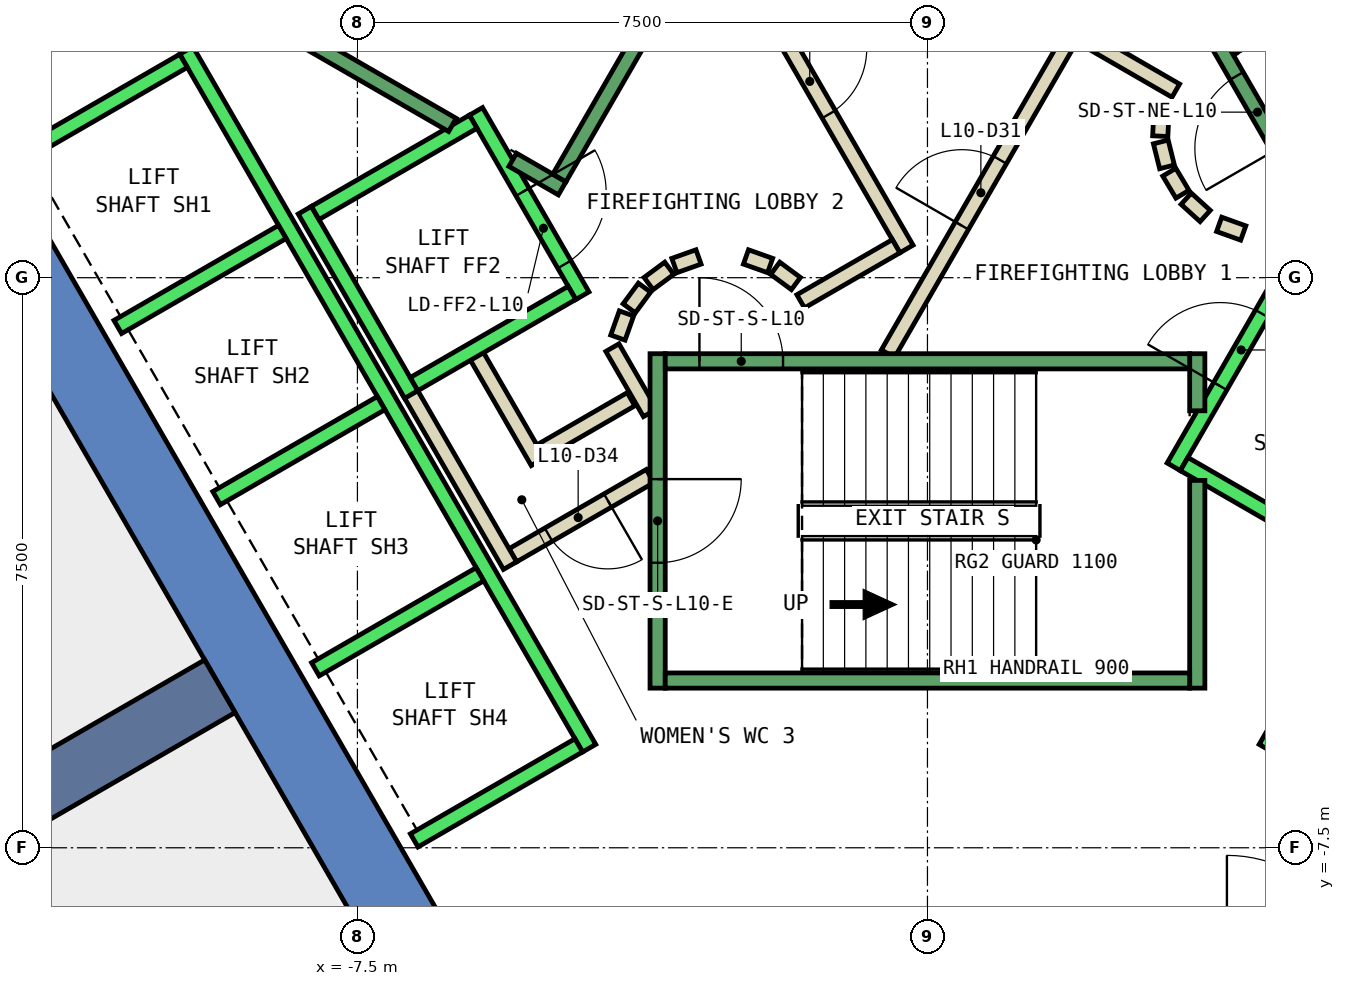
"""IFC4 building model, lengths in metres.
Left out: names, types, materials, properties, quantities, classifications, styles, units other than length and angle.
Written with IfcOpenShell. Run it as: python <this file> out.ifc"""

import sys

from ifc_helpers import new_model, si_unit, direction, frame, frame_2d, origin, place, context, subcontext, project, spatial, polyline, rectangle, outline, extrude, element, fill, save


model = new_model("IFC4")
c1 = context("Model", 3, precision=1e-05, world=origin(), true_north=direction((0.0, 1.0)))
c2 = subcontext(c1, "Body", "Model", "MODEL_VIEW")
j1 = project(units=[si_unit("LENGTHUNIT", "METRE"), si_unit("PLANEANGLEUNIT", "RADIAN")], contexts=[c1])
p1 = place(None, origin())
s1 = spatial("IfcSite", under=j1, at=p1, CompositionType="ELEMENT")
p2 = place(p1, origin())
s2 = spatial("IfcBuilding", under=s1, at=p2, CompositionType="ELEMENT")
p3 = place(p2, frame((0.0, 0.0, 51.8)))
s3 = spatial("IfcBuildingStorey", under=s2, at=p3, CompositionType="ELEMENT", Elevation=51.8)
p4 = place(p3, frame((0.0, 0.0, -0.4)))
e1 = element("IfcWall", 1, at=p4, inside=s3, PredefinedType="SHEAR", context=c2, shape_type="SweptSolid", body=[
    extrude(outline(polyline([(-13.856, 2.5), (-6.928, -9.5), (-6.351, -8.5), (-12.702, 2.5), (-13.856, 2.5)])), origin(), (0.0, 0.0, 1.0), 4.2),
])
p5 = place(p3, frame((-9.31, -5.375, -0.4), z_axis=(0.0, 0.0, 1.0), x_axis=(-0.866017533419, -0.500013631625, 0.0)))
e2 = element("IfcWall", 2, at=p5, inside=s3, PredefinedType="SHEAR", context=c2, shape_type="SweptSolid", body=[
    extrude(rectangle(XDim=9.0, YDim=0.8, at=frame_2d((4.5, 0.0))), origin(), (0.0, 0.0, 1.0), 4.2),
])
p6 = place(p3, frame((-3.9, -1.599, 0.0), z_axis=(0.0, 0.0, 1.0), x_axis=(-0.865969445389, -0.500096910261, 0.0)))
e3 = element("IfcWall", 3, at=p6, inside=s3, PredefinedType="PARTITIONING", context=c2, shape_type="SweptSolid", body=[
    extrude(rectangle(XDim=1.373, YDim=0.2, at=frame_2d((0.687, 0.0))), origin(), (0.0, 0.0, 1.0), 3.8),
])
p7 = place(p3, frame((-5.126, -2.422, 0.0), z_axis=(0.0, 0.0, 1.0), x_axis=(-0.500062241894, 0.865989465428, 0.0)))
e4 = element("IfcWall", 4, at=p7, inside=s3, PredefinedType="PARTITIONING", context=c2, shape_type="SweptSolid", body=[
    extrude(rectangle(XDim=1.7, YDim=0.2, at=frame_2d((0.85, 0.0))), origin(), (0.0, 0.0, 1.0), 3.8),
])
p8 = place(p3, frame((-3.65, -2.61, 0.0), z_axis=(0.0, 0.0, 1.0), x_axis=(-0.866072462134, -0.499918483688, 0.0)))
e5 = element("IfcWall", 5, at=p8, inside=s3, PredefinedType="PARTITIONING", context=c2, shape_type="SweptSolid", body=[
    extrude(rectangle(XDim=2.084, YDim=0.2, at=frame_2d((1.042, 0.0))), origin(), (0.0, 0.0, 1.0), 3.8),
])
p9 = place(p8, frame((0.642, 0.0, 0.0)))
e6 = element("IfcOpeningElement", 6, at=p9, cuts=e5, PredefinedType="OPENING", context=c2, shape_type="SweptSolid", body=[
    extrude(rectangle(XDim=0.9, YDim=2.1, at=frame_2d((0.45, 1.05))), frame((0.0, 0.11, 0.0), z_axis=(0.0, -1.0, 0.0), x_axis=(1.0, 0.0, 0.0)), (0.0, 0.0, 1.0), 0.22),
])
p10 = place(p3, frame((-5.492, -3.788, 0.0), z_axis=(0.0, 0.0, 1.0), x_axis=(-0.500008949224, 0.866020236886, 0.0)))
e7 = element("IfcWall", 7, at=p10, inside=s3, PredefinedType="PARTITIONING", context=c2, shape_type="SweptSolid", body=[
    extrude(rectangle(XDim=2.68, YDim=0.2, at=frame_2d((1.34, 0.0))), origin(), (0.0, 0.0, 1.0), 3.8),
])
p11 = place(p3, frame((-4.145, -0.92, 0.0), z_axis=(0.0, 0.0, 1.0), x_axis=(0.499743786207, -0.866173278362, 0.0)))
e8 = element("IfcWall", 8, at=p11, inside=s3, PredefinedType="PARTITIONING", context=c2, shape_type="SweptSolid", body=[
    extrude(rectangle(XDim=0.991, YDim=0.2, at=frame_2d((0.495, 0.0))), origin(), (0.0, 0.0, 1.0), 3.8),
])
p12 = place(p3, frame((-0.52, -1.0, 0.0), z_axis=(0.0, 0.0, 1.0), x_axis=(0.50011622646, 0.865958290007, 0.0)))
e9 = element("IfcWall", 9, at=p12, inside=s3, PredefinedType="PARTITIONING", context=c2, shape_type="SweptSolid", body=[
    extrude(rectangle(XDim=4.991, YDim=0.2, at=frame_2d((2.496, 0.0))), origin(), (0.0, 0.0, 1.0), 3.8),
])
p13 = place(p12, frame((1.945, 0.0, 0.0)))
e10 = element("IfcOpeningElement", 10, at=p13, cuts=e9, PredefinedType="OPENING", context=c2, shape_type="SweptSolid", body=[
    extrude(rectangle(XDim=1.0, YDim=2.1, at=frame_2d((0.5, 1.05))), frame((0.0, 0.11, 0.0), z_axis=(0.0, -1.0, 0.0), x_axis=(1.0, 0.0, 0.0)), (0.0, 0.0, 1.0), 0.22),
])
p14 = place(p3, frame((2.012, 3.186, 0.0), z_axis=(0.0, 0.0, 1.0), x_axis=(0.865891012941, -0.500232699559, 0.0)))
e11 = element("IfcWall", 11, at=p14, inside=s3, PredefinedType="PARTITIONING", context=c2, shape_type="SweptSolid", body=[
    extrude(rectangle(XDim=1.449, YDim=0.2, at=frame_2d((0.725, 0.0))), origin(), (0.0, 0.0, 1.0), 3.8),
])
p15 = place(p3, frame((3.079, 2.199, 0.0), z_axis=(0.0, 0.0, 1.0), x_axis=(-0.047771483479, -0.998858290933, 0.0)))
e12 = element("IfcWall", 12, at=p15, inside=s3, PredefinedType="PARTITIONING", context=c2, shape_type="SweptSolid", body=[
    extrude(rectangle(XDim=0.337, YDim=0.2, at=frame_2d((0.169, 0.0))), origin(), (0.0, 0.0, 1.0), 3.8),
])
p16 = place(p3, frame((3.07, 1.786, 0.0), z_axis=(0.0, 0.0, 1.0), x_axis=(0.242705583207, -0.970099994784, 0.0)))
e13 = element("IfcWall", 13, at=p16, inside=s3, PredefinedType="PARTITIONING", context=c2, shape_type="SweptSolid", body=[
    extrude(rectangle(XDim=0.338, YDim=0.2, at=frame_2d((0.169, 0.0))), origin(), (0.0, 0.0, 1.0), 3.8),
])
for number, where, z_axis, x_axis in (
    (14, (3.182, 1.388, 0.0), (0.0, 0.0, 1.0), (0.512, -0.859, 0.0)),
    (15, (3.404, 1.039, 0.0), (0.0, 0.0, 1.0), (0.74, -0.672, 0.0)),
):
    element("IfcWall", number, at=place(p3, frame(where, z_axis=z_axis, x_axis=x_axis)), inside=s3, PredefinedType="PARTITIONING", context=c2, shape_type="SweptSolid", body=[
        extrude(rectangle(XDim=0.338, YDim=0.2, at=frame_2d((0.169, 0.0))), origin(), (0.0, 0.0, 1.0), 3.8),
    ])
p17 = place(p3, frame((3.838, 0.702, 0.0), z_axis=(0.0, 0.0, 1.0), x_axis=(0.941035081519, -0.338308993895, 0.0)))
e16 = element("IfcWall", 16, at=p17, inside=s3, PredefinedType="PARTITIONING", context=c2, shape_type="SweptSolid", body=[
    extrude(rectangle(XDim=0.337, YDim=0.2, at=frame_2d((0.168, 0.0))), origin(), (0.0, 0.0, 1.0), 3.8),
])
p18 = place(p3, frame((-2.771, 4.7, 0.0), z_axis=(0.0, 0.0, 1.0), x_axis=(0.499969479948, -0.866043023828, 0.0)))
e17 = element("IfcWall", 17, at=p18, inside=s3, PredefinedType="PARTITIONING", context=c2, shape_type="SweptSolid", body=[
    extrude(rectangle(XDim=4.99, YDim=0.2, at=frame_2d((2.495, 0.0))), origin(), (0.0, 0.0, 1.0), 3.8),
])
p19 = place(p18, frame((1.945, 0.0, 0.0)))
e18 = element("IfcOpeningElement", 18, at=p19, cuts=e17, PredefinedType="OPENING", context=c2, shape_type="SweptSolid", body=[
    extrude(rectangle(XDim=1.0, YDim=2.1, at=frame_2d((0.5, 1.05))), frame((0.0, 0.11, 0.0), z_axis=(0.0, -1.0, 0.0), x_axis=(1.0, 0.0, 0.0)), (0.0, 0.0, 1.0), 0.22),
])
p20 = place(p3, frame((-0.412, 0.414, 0.0), z_axis=(0.0, 0.0, 1.0), x_axis=(-0.866017369001, -0.500013916395, 0.0)))
e19 = element("IfcWall", 19, at=p20, inside=s3, PredefinedType="PARTITIONING", context=c2, shape_type="SweptSolid", body=[
    extrude(rectangle(XDim=1.45, YDim=0.2, at=frame_2d((0.725, 0.0))), origin(), (0.0, 0.0, 1.0), 3.8),
])
p21 = place(p3, frame((-1.731, -0.077, 0.0), z_axis=(0.0, 0.0, 1.0), x_axis=(-0.804311165252, 0.594208338422, 0.0)))
e20 = element("IfcWall", 20, at=p21, inside=s3, PredefinedType="PARTITIONING", context=c2, shape_type="SweptSolid", body=[
    extrude(rectangle(XDim=0.338, YDim=0.2, at=frame_2d((0.169, 0.0))), origin(), (0.0, 0.0, 1.0), 3.8),
])
p22 = place(p3, frame((-2.07, 0.16, 0.0), z_axis=(0.0, 0.0, 1.0), x_axis=(-0.942199461132, 0.335052496547, 0.0)))
e21 = element("IfcWall", 21, at=p22, inside=s3, PredefinedType="PARTITIONING", context=c2, shape_type="SweptSolid", body=[
    extrude(rectangle(XDim=0.337, YDim=0.2, at=frame_2d((0.169, 0.0))), origin(), (0.0, 0.0, 1.0), 3.8),
])
p23 = place(p3, frame((-3.012, 0.273, 0.0), z_axis=(0.0, 0.0, 1.0), x_axis=(-0.942280615813, -0.334824194261, 0.0)))
e22 = element("IfcWall", 22, at=p23, inside=s3, PredefinedType="PARTITIONING", context=c2, shape_type="SweptSolid", body=[
    extrude(rectangle(XDim=0.338, YDim=0.2, at=frame_2d((0.169, 0.0))), origin(), (0.0, 0.0, 1.0), 3.8),
])
p24 = place(p3, frame((-3.397, 0.124, 0.0), z_axis=(0.0, 0.0, 1.0), x_axis=(-0.804311165252, -0.594208338422, 0.0)))
e23 = element("IfcWall", 23, at=p24, inside=s3, PredefinedType="PARTITIONING", context=c2, shape_type="SweptSolid", body=[
    extrude(rectangle(XDim=0.338, YDim=0.2, at=frame_2d((0.169, 0.0))), origin(), (0.0, 0.0, 1.0), 3.8),
])
p25 = place(p3, frame((-3.723, -0.131, 0.0), z_axis=(0.0, 0.0, 1.0), x_axis=(-0.594675113454, -0.803966112121, 0.0)))
e24 = element("IfcWall", 24, at=p25, inside=s3, PredefinedType="PARTITIONING", context=c2, shape_type="SweptSolid", body=[
    extrude(rectangle(XDim=0.338, YDim=0.2, at=frame_2d((0.169, 0.0))), origin(), (0.0, 0.0, 1.0), 3.8),
])
p26 = place(p3, frame((-3.96, -0.47, 0.0), z_axis=(0.0, 0.0, 1.0), x_axis=(-0.334824194261, -0.942280615813, 0.0)))
e25 = element("IfcWall", 25, at=p26, inside=s3, PredefinedType="PARTITIONING", context=c2, shape_type="SweptSolid", body=[
    extrude(rectangle(XDim=0.338, YDim=0.2, at=frame_2d((0.169, 0.0))), origin(), (0.0, 0.0, 1.0), 3.8),
])
p27 = place(p3, frame((-5.94, 2.188, 0.0), z_axis=(0.0, 0.0, 1.0), x_axis=(0.49994636267, -0.866056369097, 0.0)))
e26 = element("IfcWall", 26, at=p27, inside=s3, PredefinedType="STANDARD", context=c2, shape_type="SweptSolid", body=[
    extrude(rectangle(XDim=2.8, YDim=0.2, at=frame_2d((1.4, 0.0))), origin(), (0.0, 0.0, 1.0), 3.8),
])
p28 = place(p27, frame((1.225, 0.0, 0.0)))
e27 = element("IfcOpeningElement", 27, at=p28, cuts=e26, PredefinedType="OPENING", context=c2, shape_type="SweptSolid", body=[
    extrude(rectangle(XDim=1.1, YDim=2.1, at=frame_2d((0.55, 1.05))), frame((0.0, 0.11, 0.0), z_axis=(0.0, -1.0, 0.0), x_axis=(1.0, 0.0, 0.0)), (0.0, 0.0, 1.0), 0.22),
])
p29 = place(p3, frame((-8.192, 0.888, 0.0), z_axis=(0.0, 0.0, 1.0), x_axis=(0.49994636267, -0.866056369097, 0.0)))
e28 = element("IfcWall", 28, at=p29, inside=s3, PredefinedType="STANDARD", context=c2, shape_type="SweptSolid", body=[
    extrude(rectangle(XDim=2.8, YDim=0.2, at=frame_2d((1.4, 0.0))), origin(), (0.0, 0.0, 1.0), 3.8),
])
for number, where, z_axis, x_axis in (
    (29, (-5.977, 2.052, 0.0), (0.0, 0.0, 1.0), (-0.866, -0.5, 0.0)),
    (30, (-4.677, -0.2, 0.0), (0.0, 0.0, 1.0), (-0.866, -0.5, 0.0)),
):
    element("IfcWall", number, at=place(p3, frame(where, z_axis=z_axis, x_axis=x_axis)), inside=s3, PredefinedType="STANDARD", context=c2, shape_type="SweptSolid", body=[
        extrude(rectangle(XDim=2.399, YDim=0.2, at=frame_2d((1.2, 0.0))), origin(), (0.0, 0.0, 1.0), 3.8),
    ])
p30 = place(p3, frame((-9.751, 2.99, 0.0), z_axis=(0.0, 0.0, 1.0), x_axis=(0.50000090737, -0.866024879913, 0.0)))
e31 = element("IfcWall", 31, at=p30, inside=s3, PredefinedType="STANDARD", context=c2, shape_type="SweptSolid", body=[
    extrude(rectangle(XDim=10.6, YDim=0.2, at=frame_2d((5.3, 0.0))), origin(), (0.0, 0.0, 1.0), 3.8),
])
p31 = place(p3, frame((-9.788, 2.853, 0.0), z_axis=(0.0, 0.0, 1.0), x_axis=(-0.865998541277, -0.500046524342, 0.0)))
e32 = element("IfcWall", 32, at=p31, inside=s3, PredefinedType="STANDARD", context=c2, shape_type="SweptSolid", body=[
    extrude(rectangle(XDim=2.5, YDim=0.2, at=frame_2d((1.25, 0.0))), origin(), (0.0, 0.0, 1.0), 3.8),
])
for number, where, z_axis, x_axis in (
    (33, (-8.488, 0.602, 0.0), (0.0, 0.0, 1.0), (-0.866, -0.5, 0.0)),
    (34, (-7.188, -1.65, 0.0), (0.0, 0.0, 1.0), (-0.866, -0.5, 0.0)),
    (35, (-5.888, -3.902, 0.0), (0.0, 0.0, 1.0), (-0.866, -0.5, 0.0)),
    (36, (-4.588, -6.153, 0.0), (0.0, 0.0, 1.0), (-0.866, -0.5, 0.0)),
):
    element("IfcWall", number, at=place(p3, frame(where, z_axis=z_axis, x_axis=x_axis)), inside=s3, PredefinedType="STANDARD", context=c2, shape_type="SweptSolid", body=[
        extrude(rectangle(XDim=2.5, YDim=0.2, at=frame_2d((1.25, 0.0))), origin(), (0.0, 0.0, 1.0), 3.8),
    ])
p32 = place(p3, frame((3.24, -2.488, 0.0), z_axis=(0.0, 0.0, 1.0), x_axis=(0.49994636267, 0.866056369097, 0.0)))
e37 = element("IfcWall", 37, at=p32, inside=s3, PredefinedType="STANDARD", context=c2, shape_type="SweptSolid", body=[
    extrude(rectangle(XDim=2.8, YDim=0.2, at=frame_2d((1.4, 0.0))), origin(), (0.0, 0.0, 1.0), 3.8),
])
p33 = place(p32, frame((1.225, 0.0, 0.0)))
e38 = element("IfcOpeningElement", 38, at=p33, cuts=e37, PredefinedType="OPENING", context=c2, shape_type="SweptSolid", body=[
    extrude(rectangle(XDim=1.1, YDim=2.1, at=frame_2d((0.55, 1.05))), frame((0.0, 0.11, 0.0), z_axis=(0.0, -1.0, 0.0), x_axis=(1.0, 0.0, 0.0)), (0.0, 0.0, 1.0), 0.22),
])
p34 = place(p3, frame((3.377, -2.452, 0.0), z_axis=(0.0, 0.0, 1.0), x_axis=(0.865955154139, -0.50012165622, 0.0)))
e39 = element("IfcWall", 39, at=p34, inside=s3, PredefinedType="STANDARD", context=c2, shape_type="SweptSolid", body=[
    extrude(rectangle(XDim=2.4, YDim=0.2, at=frame_2d((1.2, 0.0))), origin(), (0.0, 0.0, 1.0), 3.8),
])
p35 = place(p3, frame((4.451, -6.19, 0.0), z_axis=(0.0, 0.0, 1.0), x_axis=(0.50000090737, 0.866024879913, 0.0)))
e40 = element("IfcWall", 40, at=p35, inside=s3, PredefinedType="STANDARD", context=c2, shape_type="SweptSolid", body=[
    extrude(rectangle(XDim=10.6, YDim=0.2, at=frame_2d((5.3, 0.0))), origin(), (0.0, 0.0, 1.0), 3.8),
])
p36 = place(p3, frame((-3.55, -1.0, 0.0), z_axis=(0.0, 0.0, 1.0), x_axis=(0.0, -1.0, 0.0)))
e41 = element("IfcWall", 41, at=p36, inside=s3, PredefinedType="STANDARD", context=c2, shape_type="SweptSolid", body=[
    extrude(rectangle(XDim=4.4, YDim=0.2, at=frame_2d((2.2, 0.0))), origin(), (0.0, 0.0, 1.0), 3.8),
])
p37 = place(p36, frame((1.65, 0.0, 0.0)))
e42 = element("IfcOpeningElement", 42, at=p37, cuts=e41, PredefinedType="OPENING", context=c2, shape_type="SweptSolid", body=[
    extrude(rectangle(XDim=1.1, YDim=2.2, at=frame_2d((0.55, 1.1))), frame((0.0, 0.11, 0.0), z_axis=(0.0, -1.0, 0.0), x_axis=(1.0, 0.0, 0.0)), (0.0, 0.0, 1.0), 0.22),
])
p38 = place(p3, frame((3.55, -2.667, 0.0), z_axis=(0.0, 0.0, 1.0), x_axis=(0.0, -1.0, 0.0)))
e43 = element("IfcWall", 43, at=p38, inside=s3, PredefinedType="STANDARD", context=c2, shape_type="SweptSolid", body=[
    extrude(rectangle(XDim=2.733, YDim=0.2, at=frame_2d((1.366, 0.0))), origin(), (0.0, 0.0, 1.0), 3.8),
])
p39 = place(p3, frame((3.55, -1.0, 0.0), z_axis=(0.0, 0.0, 1.0), x_axis=(0.0, -1.0, 0.0)))
e44 = element("IfcWall", 44, at=p39, inside=s3, PredefinedType="STANDARD", context=c2, shape_type="SweptSolid", body=[
    extrude(rectangle(XDim=0.751, YDim=0.2, at=frame_2d((0.375, 0.0))), origin(), (0.0, 0.0, 1.0), 3.8),
])
p40 = place(p3, frame((-3.45, -1.1, 0.0), z_axis=(0.0, 0.0, 1.0), x_axis=(1.0, 0.0, 0.0)))
e45 = element("IfcWall", 45, at=p40, inside=s3, PredefinedType="STANDARD", context=c2, shape_type="SweptSolid", body=[
    extrude(rectangle(XDim=6.9, YDim=0.2, at=frame_2d((3.45, 0.0))), origin(), (0.0, 0.0, 1.0), 3.8),
])
p41 = place(p40, frame((0.45, 0.0, 0.0)))
e46 = element("IfcOpeningElement", 46, at=p41, cuts=e45, PredefinedType="OPENING", context=c2, shape_type="SweptSolid", body=[
    extrude(rectangle(XDim=1.1, YDim=2.2, at=frame_2d((0.55, 1.1))), frame((0.0, 0.11, 0.0), z_axis=(0.0, -1.0, 0.0), x_axis=(1.0, 0.0, 0.0)), (0.0, 0.0, 1.0), 0.22),
])
p42 = place(p3, frame((-3.45, -5.3, 0.0), z_axis=(0.0, 0.0, 1.0), x_axis=(1.0, 0.0, 0.0)))
e47 = element("IfcWall", 47, at=p42, inside=s3, PredefinedType="STANDARD", context=c2, shape_type="SweptSolid", body=[
    extrude(rectangle(XDim=6.9, YDim=0.2, at=frame_2d((3.45, 0.0))), origin(), (0.0, 0.0, 1.0), 3.8),
])
p43 = place(p3, frame((4.843, 1.312, 0.0), z_axis=(0.0, 0.0, 1.0), x_axis=(-0.499963383562, 0.866046543262, 0.0)))
e48 = element("IfcWall", 48, at=p43, inside=s3, PredefinedType="STANDARD", context=c2, shape_type="SweptSolid", body=[
    extrude(rectangle(XDim=6.9, YDim=0.2, at=frame_2d((3.45, 0.0))), origin(), (0.0, 0.0, 1.0), 3.8),
])
p44 = place(p43, frame((0.45, 0.0, 0.0)))
e49 = element("IfcOpeningElement", 49, at=p44, cuts=e48, PredefinedType="OPENING", context=c2, shape_type="SweptSolid", body=[
    extrude(rectangle(XDim=1.1, YDim=2.2, at=frame_2d((0.55, 1.1))), frame((0.0, 0.11, 0.0), z_axis=(0.0, -1.0, 0.0), x_axis=(1.0, 0.0, 0.0)), (0.0, 0.0, 1.0), 0.22),
])
p45 = place(p3, frame((-6.25, 2.01, 0.0), z_axis=(0.0, 0.0, 1.0), x_axis=(-0.86611865017, 0.499838457731, 0.0)))
e50 = element("IfcWall", 50, at=p45, inside=s3, PredefinedType="STANDARD", context=c2, shape_type="SweptSolid", body=[
    extrude(rectangle(XDim=2.733, YDim=0.2, at=frame_2d((1.366, 0.0))), origin(), (0.0, 0.0, 1.0), 3.8),
])
p46 = place(p3, frame((-4.806, 1.176, 0.0), z_axis=(0.0, 0.0, 1.0), x_axis=(-0.866558586415, 0.499075361355, 0.0)))
e51 = element("IfcWall", 51, at=p46, inside=s3, PredefinedType="STANDARD", context=c2, shape_type="SweptSolid", body=[
    extrude(rectangle(XDim=0.751, YDim=0.2, at=frame_2d((0.376, 0.0))), origin(), (0.0, 0.0, 1.0), 3.8),
])
p47 = place(p3, frame((-1.393, 7.288, 0.0), z_axis=(0.0, 0.0, 1.0), x_axis=(-0.499963383562, -0.866046543262, 0.0)))
e52 = element("IfcWall", 52, at=p47, inside=s3, PredefinedType="STANDARD", context=c2, shape_type="SweptSolid", body=[
    extrude(rectangle(XDim=6.9, YDim=0.2, at=frame_2d((3.45, 0.0))), origin(), (0.0, 0.0, 1.0), 3.8),
])
p48 = place(p47, frame((0.45, 0.0, 0.0)))
e53 = element("IfcOpeningElement", 53, at=p48, cuts=e52, PredefinedType="OPENING", context=c2, shape_type="SweptSolid", body=[
    extrude(rectangle(XDim=1.1, YDim=2.2, at=frame_2d((0.55, 1.1))), frame((0.0, 0.11, 0.0), z_axis=(0.0, -1.0, 0.0), x_axis=(1.0, 0.0, 0.0)), (0.0, 0.0, 1.0), 0.22),
])
p49 = place(p13, origin())
e54 = element("IfcDoor", 54, at=p49, inside=s3, OperationType="SINGLE_SWING_LEFT", PredefinedType="DOOR", context=c2, shape_type="SweptSolid", body=[
    extrude(rectangle(XDim=1.0, YDim=2.1, at=frame_2d((0.5, 1.05))), frame((0.0, 0.025, 0.0), z_axis=(0.0, -1.0, 0.0), x_axis=(1.0, 0.0, 0.0)), (0.0, 0.0, 1.0), 0.05),
])
fill(e10, e54)
p50 = place(p19, origin())
e55 = element("IfcDoor", 55, at=p50, inside=s3, OperationType="SINGLE_SWING_RIGHT", PredefinedType="DOOR", context=c2, shape_type="SweptSolid", body=[
    extrude(rectangle(XDim=1.0, YDim=2.1, at=frame_2d((0.5, 1.05))), frame((0.0, 0.025, 0.0), z_axis=(0.0, -1.0, 0.0), x_axis=(1.0, 0.0, 0.0)), (0.0, 0.0, 1.0), 0.05),
])
fill(e18, e55)
p51 = place(p9, origin())
e56 = element("IfcDoor", 56, at=p51, inside=s3, OperationType="SINGLE_SWING_LEFT", PredefinedType="DOOR", context=c2, shape_type="SweptSolid", body=[
    extrude(rectangle(XDim=0.9, YDim=2.1, at=frame_2d((0.45, 1.05))), frame((0.0, 0.025, 0.0), z_axis=(0.0, -1.0, 0.0), x_axis=(1.0, 0.0, 0.0)), (0.0, 0.0, 1.0), 0.05),
])
fill(e6, e56)
p52 = place(p33, origin())
e57 = element("IfcDoor", 57, at=p52, inside=s3, OperationType="SLIDING_TO_LEFT", PredefinedType="DOOR", context=c2, shape_type="SweptSolid", body=[
    extrude(rectangle(XDim=1.1, YDim=2.1, at=frame_2d((0.55, 1.05))), frame((0.0, 0.025, 0.0), z_axis=(0.0, -1.0, 0.0), x_axis=(1.0, 0.0, 0.0)), (0.0, 0.0, 1.0), 0.05),
])
fill(e38, e57)
p53 = place(p28, origin())
e58 = element("IfcDoor", 58, at=p53, inside=s3, OperationType="SLIDING_TO_LEFT", PredefinedType="DOOR", context=c2, shape_type="SweptSolid", body=[
    extrude(rectangle(XDim=1.1, YDim=2.1, at=frame_2d((0.55, 1.05))), frame((0.0, 0.025, 0.0), z_axis=(0.0, -1.0, 0.0), x_axis=(1.0, 0.0, 0.0)), (0.0, 0.0, 1.0), 0.05),
])
fill(e27, e58)
p54 = place(p41, origin())
e59 = element("IfcDoor", 59, at=p54, inside=s3, OperationType="SINGLE_SWING_LEFT", PredefinedType="DOOR", context=c2, shape_type="SweptSolid", body=[
    extrude(rectangle(XDim=1.1, YDim=2.2, at=frame_2d((0.55, 1.1))), frame((0.0, 0.025, 0.0), z_axis=(0.0, -1.0, 0.0), x_axis=(1.0, 0.0, 0.0)), (0.0, 0.0, 1.0), 0.05),
])
fill(e46, e59)
p55 = place(p37, origin())
e60 = element("IfcDoor", 60, at=p55, inside=s3, OperationType="SINGLE_SWING_LEFT", PredefinedType="DOOR", context=c2, shape_type="SweptSolid", body=[
    extrude(rectangle(XDim=1.1, YDim=2.2, at=frame_2d((0.55, 1.1))), frame((0.0, 0.025, 0.0), z_axis=(0.0, -1.0, 0.0), x_axis=(1.0, 0.0, 0.0)), (0.0, 0.0, 1.0), 0.05),
])
fill(e42, e60)
p56 = place(p44, origin())
e61 = element("IfcDoor", 61, at=p56, inside=s3, OperationType="SINGLE_SWING_LEFT", PredefinedType="DOOR", context=c2, shape_type="SweptSolid", body=[
    extrude(rectangle(XDim=1.1, YDim=2.2, at=frame_2d((0.55, 1.1))), frame((0.0, 0.025, 0.0), z_axis=(0.0, -1.0, 0.0), x_axis=(1.0, 0.0, 0.0)), (0.0, 0.0, 1.0), 0.05),
])
fill(e49, e61)
save(model, sys.argv[1])
